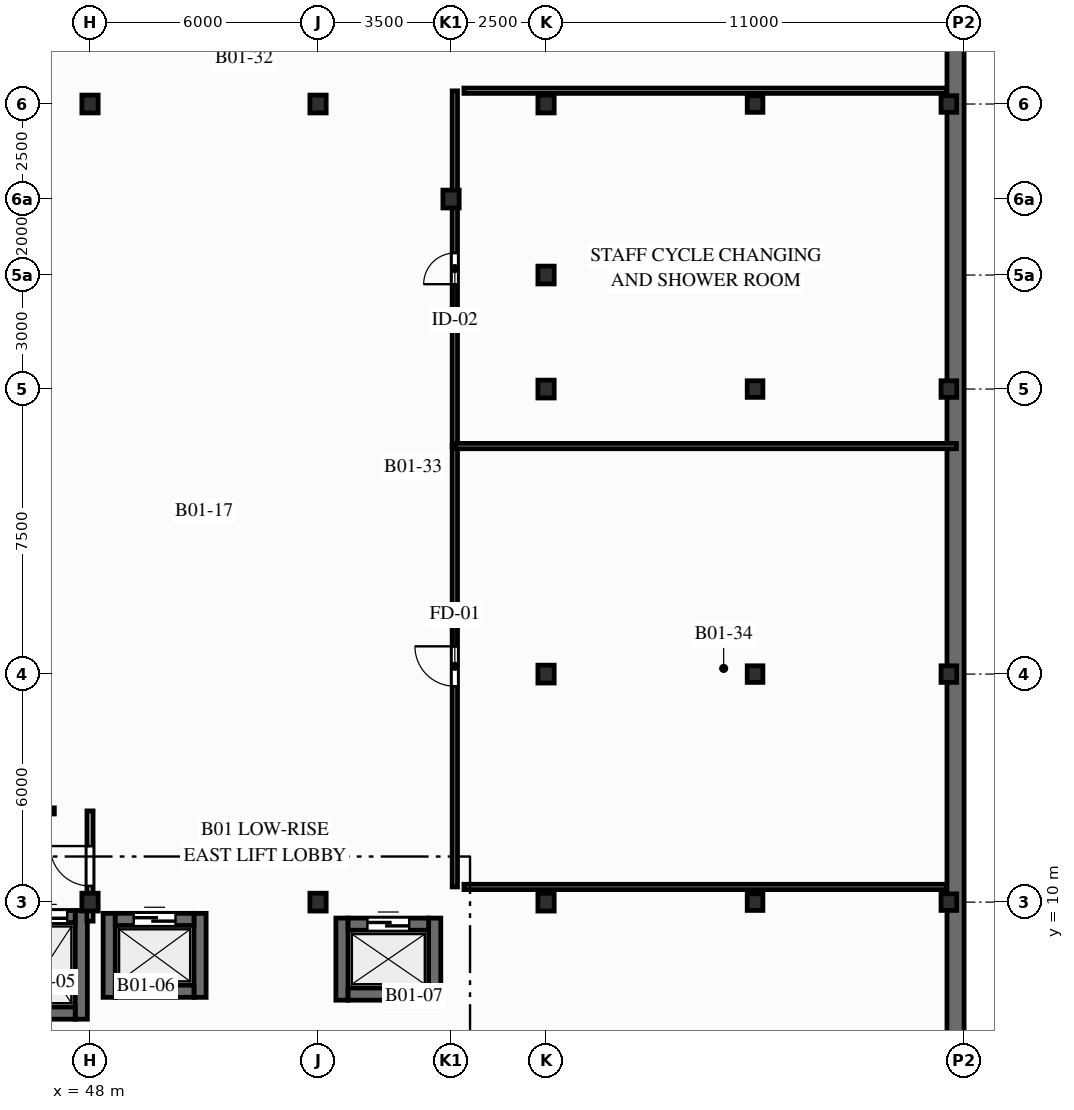
"""IFC4 building model, lengths in metres.
Left out: names, types, materials, properties, quantities, classifications, styles, units other than length and angle.
Written with IfcOpenShell. Run it as: python <this file> out.ifc"""

import sys

from ifc_helpers import new_model, si_unit, direction, frame, frame_2d, origin, origin_2d, place, context, subcontext, project, spatial, rectangle, i_section, extrude, element, fill, save


model = new_model("IFC4")
c1 = context("Model", 3, precision=1e-05, world=origin(), true_north=direction((0.0, 1.0)))
c2 = subcontext(c1, "Body", "Model", "MODEL_VIEW")
j1 = project(units=[si_unit("LENGTHUNIT", "METRE"), si_unit("PLANEANGLEUNIT", "RADIAN")], contexts=[c1])
p1 = place(None, origin())
s1 = spatial("IfcSite", under=j1, at=p1, CompositionType="ELEMENT")
p2 = place(p1, origin())
s2 = spatial("IfcBuilding", under=s1, at=p2, CompositionType="ELEMENT")
p3 = place(p2, frame((0.0, 0.0, -4.2)))
s3 = spatial("IfcBuildingStorey", under=s2, at=p3, CompositionType="ELEMENT", Elevation=-4.2)
for number, where, z_axis, x_axis in (
    (1, (48.0, 10.0, 0.0), (0.0, 0.0, 1.0), (1.0, 0.0, 0.0)),
    (2, (48.0, 31.0, 0.0), (0.0, 0.0, 1.0), (1.0, 0.0, 0.0)),
    (3, (54.0, 10.0, 0.0), (0.0, 0.0, 1.0), (1.0, 0.0, 0.0)),
    (4, (54.0, 31.0, 0.0), (0.0, 0.0, 1.0), (1.0, 0.0, 0.0)),
    (5, (57.5, 28.5, 0.0), (0.0, 0.0, 1.0), (1.0, 0.0, 0.0)),
    (6, (60.0, 10.0, 0.0), (0.0, 0.0, 1.0), (1.0, 0.0, 0.0)),
    (7, (60.0, 16.0, 0.0), (0.0, 0.0, 1.0), (1.0, 0.0, 0.0)),
    (8, (60.0, 23.5, 0.0), (0.0, 0.0, 1.0), (1.0, 0.0, 0.0)),
    (9, (60.0, 26.5, 0.0), (0.0, 0.0, 1.0), (1.0, 0.0, 0.0)),
    (10, (60.0, 31.0, 0.0), (0.0, 0.0, 1.0), (1.0, 0.0, 0.0)),
):
    element("IfcColumn", number, at=place(p3, frame(where, z_axis=z_axis, x_axis=x_axis)), inside=s3, PredefinedType="COLUMN", context=c2, shape_type="SweptSolid", body=[
        extrude(i_section(OverallWidth=0.428, OverallDepth=0.469, WebThickness=0.078, FlangeThickness=0.125, FilletRadius=0.015, at=origin_2d()), origin(), (0.0, 0.0, 1.0), 4.2),
    ])
for number, where, z_axis, x_axis in (
    (11, (65.5, 10.0, 0.0), (0.0, 0.0, 1.0), (1.0, 0.0, 0.0)),
    (12, (65.5, 16.0, 0.0), (0.0, 0.0, 1.0), (1.0, 0.0, 0.0)),
    (13, (65.5, 23.5, 0.0), (0.0, 0.0, 1.0), (1.0, 0.0, 0.0)),
    (14, (65.5, 31.0, 0.0), (0.0, 0.0, 1.0), (1.0, 0.0, 0.0)),
    (15, (70.6, 10.0, 0.0), (0.0, 0.0, 1.0), (1.0, 0.0, 0.0)),
    (16, (70.6, 16.0, 0.0), (0.0, 0.0, 1.0), (1.0, 0.0, 0.0)),
    (17, (70.6, 23.5, 0.0), (0.0, 0.0, 1.0), (1.0, 0.0, 0.0)),
    (18, (70.6, 31.0, 0.0), (0.0, 0.0, 1.0), (1.0, 0.0, 0.0)),
):
    element("IfcColumn", number, at=place(p3, frame(where, z_axis=z_axis, x_axis=x_axis)), inside=s3, PredefinedType="COLUMN", context=c2, shape_type="SweptSolid", body=[
        extrude(i_section(OverallWidth=0.412, OverallDepth=0.437, WebThickness=0.036, FlangeThickness=0.058, FilletRadius=0.015, at=origin_2d()), origin(), (0.0, 0.0, 1.0), 4.2),
    ])
p4 = place(p3, frame((70.775, -1.775, 0.0), z_axis=(0.0, 0.0, 1.0), x_axis=(0.0, 1.0, 0.0)))
e19 = element("IfcWall", 19, at=p4, inside=s3, PredefinedType="SHEAR", context=c2, shape_type="SweptSolid", body=[
    extrude(rectangle(XDim=41.55, YDim=0.45, at=frame_2d((20.775, 0.0))), origin(), (0.0, 0.0, 1.0), 3.22),
])
p5 = place(p3, frame((47.77, 6.92, 0.0), z_axis=(0.0, 0.0, 1.0), x_axis=(0.0, 1.0, 0.0)))
e20 = element("IfcWall", 20, at=p5, inside=s3, PredefinedType="SHEAR", context=c2, shape_type="SweptSolid", body=[
    extrude(rectangle(XDim=2.86, YDim=0.32, at=frame_2d((1.43, 0.0))), origin(), (0.0, 0.0, 1.0), 3.86),
])
p6 = place(p3, frame((46.09, 7.08, 0.0), z_axis=(0.0, 0.0, 1.0), x_axis=(1.0, 0.0, 0.0)))
e21 = element("IfcWall", 21, at=p6, inside=s3, PredefinedType="SHEAR", context=c2, shape_type="SweptSolid", body=[
    extrude(rectangle(XDim=1.52, YDim=0.32, at=frame_2d((0.76, 0.0))), origin(), (0.0, 0.0, 1.0), 3.86),
])
p7 = place(p3, frame((46.09, 9.62, 0.0), z_axis=(0.0, 0.0, 1.0), x_axis=(1.0, 0.0, 0.0)))
e22 = element("IfcWall", 22, at=p7, inside=s3, PredefinedType="SHEAR", context=c2, shape_type="SweptSolid", body=[
    extrude(rectangle(XDim=1.52, YDim=0.32, at=frame_2d((0.76, 0.0))), origin(), (0.0, 0.0, 1.0), 3.86),
])
p8 = place(p7, frame((0.21, 0.0, 0.0)))
e23 = element("IfcOpeningElement", 23, at=p8, cuts=e22, PredefinedType="OPENING", context=c2, shape_type="SweptSolid", body=[
    extrude(rectangle(XDim=1.1, YDim=2.06, at=frame_2d((0.55, 1.03))), frame((0.0, 0.17, 0.0), z_axis=(0.0, -1.0, 0.0), x_axis=(1.0, 0.0, 0.0)), (0.0, 0.0, 1.0), 0.34),
])
for number, where, z_axis, x_axis in (
    (24, (48.505, 7.495, 0.0), (0.0, 0.0, 1.0), (0.0, 1.0, 0.0)),
    (25, (50.895, 7.495, 0.0), (0.0, 0.0, 1.0), (0.0, 1.0, 0.0)),
):
    element("IfcWall", number, at=place(p3, frame(where, z_axis=z_axis, x_axis=x_axis)), inside=s3, PredefinedType="SHEAR", context=c2, shape_type="SweptSolid", body=[
        extrude(rectangle(XDim=2.21, YDim=0.32, at=frame_2d((1.105, 0.0))), origin(), (0.0, 0.0, 1.0), 3.86),
    ])
p9 = place(p3, frame((48.665, 7.655, 0.0), z_axis=(0.0, 0.0, 1.0), x_axis=(1.0, 0.0, 0.0)))
e26 = element("IfcWall", 26, at=p9, inside=s3, PredefinedType="SHEAR", context=c2, shape_type="SweptSolid", body=[
    extrude(rectangle(XDim=2.07, YDim=0.32, at=frame_2d((1.035, 0.0))), origin(), (0.0, 0.0, 1.0), 3.86),
])
p10 = place(p3, frame((48.665, 9.545, 0.0), z_axis=(0.0, 0.0, 1.0), x_axis=(1.0, 0.0, 0.0)))
e27 = element("IfcWall", 27, at=p10, inside=s3, PredefinedType="SHEAR", context=c2, shape_type="SweptSolid", body=[
    extrude(rectangle(XDim=2.07, YDim=0.32, at=frame_2d((1.035, 0.0))), origin(), (0.0, 0.0, 1.0), 3.86),
])
p11 = place(p10, frame((0.485, 0.0, 0.0)))
e28 = element("IfcOpeningElement", 28, at=p11, cuts=e27, PredefinedType="OPENING", context=c2, shape_type="SweptSolid", body=[
    extrude(rectangle(XDim=1.1, YDim=2.06, at=frame_2d((0.55, 1.03))), frame((0.0, 0.17, 0.0), z_axis=(0.0, -1.0, 0.0), x_axis=(1.0, 0.0, 0.0)), (0.0, 0.0, 1.0), 0.34),
])
for number, where, z_axis, x_axis in (
    (29, (54.63, 7.42, 0.0), (0.0, 0.0, 1.0), (0.0, 1.0, 0.0)),
    (30, (57.07, 7.42, 0.0), (0.0, 0.0, 1.0), (0.0, 1.0, 0.0)),
):
    element("IfcWall", number, at=place(p3, frame(where, z_axis=z_axis, x_axis=x_axis)), inside=s3, PredefinedType="SHEAR", context=c2, shape_type="SweptSolid", body=[
        extrude(rectangle(XDim=2.16, YDim=0.32, at=frame_2d((1.08, 0.0))), origin(), (0.0, 0.0, 1.0), 3.86),
    ])
p12 = place(p3, frame((54.79, 7.58, 0.0), z_axis=(0.0, 0.0, 1.0), x_axis=(1.0, 0.0, 0.0)))
e31 = element("IfcWall", 31, at=p12, inside=s3, PredefinedType="SHEAR", context=c2, shape_type="SweptSolid", body=[
    extrude(rectangle(XDim=2.12, YDim=0.32, at=frame_2d((1.06, 0.0))), origin(), (0.0, 0.0, 1.0), 3.86),
])
p13 = place(p3, frame((54.79, 9.42, 0.0), z_axis=(0.0, 0.0, 1.0), x_axis=(1.0, 0.0, 0.0)))
e32 = element("IfcWall", 32, at=p13, inside=s3, PredefinedType="SHEAR", context=c2, shape_type="SweptSolid", body=[
    extrude(rectangle(XDim=2.12, YDim=0.32, at=frame_2d((1.06, 0.0))), origin(), (0.0, 0.0, 1.0), 3.86),
])
p14 = place(p13, frame((0.51, 0.0, 0.0)))
e33 = element("IfcOpeningElement", 33, at=p14, cuts=e32, PredefinedType="OPENING", context=c2, shape_type="SweptSolid", body=[
    extrude(rectangle(XDim=1.1, YDim=2.06, at=frame_2d((0.55, 1.03))), frame((0.0, 0.17, 0.0), z_axis=(0.0, -1.0, 0.0), x_axis=(1.0, 0.0, 0.0)), (0.0, 0.0, 1.0), 0.34),
])
p15 = place(p3, frame((48.0, 9.5, 0.0), z_axis=(0.0, 0.0, 1.0), x_axis=(0.0, 1.0, 0.0)))
e34 = element("IfcWall", 34, at=p15, inside=s3, PredefinedType="PARTITIONING", context=c2, shape_type="SweptSolid", body=[
    extrude(rectangle(XDim=2.9, YDim=0.16, at=frame_2d((1.45, 0.0))), origin(), (0.0, 0.0, 1.0), 2.908),
])
p16 = place(p15, frame((0.925, 0.0, 0.0)))
e35 = element("IfcOpeningElement", 35, at=p16, cuts=e34, PredefinedType="OPENING", context=c2, shape_type="SweptSolid", body=[
    extrude(rectangle(XDim=1.05, YDim=2.06, at=frame_2d((0.525, 1.03))), frame((0.0, 0.09, 0.0), z_axis=(0.0, -1.0, 0.0), x_axis=(1.0, 0.0, 0.0)), (0.0, 0.0, 1.0), 0.18),
])
p17 = place(p3, frame((42.539, 12.4, 0.0), z_axis=(0.0, 0.0, 1.0), x_axis=(1.0, 0.0, 0.0)))
e36 = element("IfcWall", 36, at=p17, inside=s3, PredefinedType="PARTITIONING", context=c2, shape_type="SweptSolid", body=[
    extrude(rectangle(XDim=4.522, YDim=0.16, at=frame_2d((2.261, 0.0))), origin(), (0.0, 0.0, 1.0), 3.86),
])
p18 = place(p3, frame((57.6, 10.4, 0.0), z_axis=(0.0, 0.0, 1.0), x_axis=(0.0, 1.0, 0.0)))
e37 = element("IfcWall", 37, at=p18, inside=s3, PredefinedType="PARTITIONING", context=c2, shape_type="SweptSolid", body=[
    extrude(rectangle(XDim=11.611, YDim=0.14, at=frame_2d((5.806, 0.0))), origin(), (0.0, 0.0, 1.0), 3.378),
])
p19 = place(p18, frame((5.281, 0.0, 0.0)))
e38 = element("IfcOpeningElement", 38, at=p19, cuts=e37, PredefinedType="OPENING", context=c2, shape_type="SweptSolid", body=[
    extrude(rectangle(XDim=1.05, YDim=2.06, at=frame_2d((0.525, 1.03))), frame((0.0, 0.08, 0.0), z_axis=(0.0, -1.0, 0.0), x_axis=(1.0, 0.0, 0.0)), (0.0, 0.0, 1.0), 0.16),
])
p20 = place(p3, frame((57.6, 21.993, 0.0), z_axis=(0.0, 0.0, 1.0), x_axis=(0.0, 1.0, 0.0)))
e39 = element("IfcWall", 39, at=p20, inside=s3, PredefinedType="PARTITIONING", context=c2, shape_type="SweptSolid", body=[
    extrude(rectangle(XDim=9.353, YDim=0.14, at=frame_2d((4.677, 0.0))), origin(), (0.0, 0.0, 1.0), 3.223),
])
p21 = place(p20, frame((4.267, 0.0, 0.0)))
e40 = element("IfcOpeningElement", 40, at=p21, cuts=e39, PredefinedType="OPENING", context=c2, shape_type="SweptSolid", body=[
    extrude(rectangle(XDim=0.82, YDim=2.02, at=frame_2d((0.41, 1.01))), frame((0.0, 0.08, 0.0), z_axis=(0.0, -1.0, 0.0), x_axis=(1.0, 0.0, 0.0)), (0.0, 0.0, 1.0), 0.16),
])
p22 = place(p3, frame((57.604, 22.0, 0.0), z_axis=(0.0, 0.0, 1.0), x_axis=(1.0, 0.0, 0.0)))
e41 = element("IfcWall", 41, at=p22, inside=s3, PredefinedType="PARTITIONING", context=c2, shape_type="SweptSolid", body=[
    extrude(rectangle(XDim=13.196, YDim=0.14, at=frame_2d((6.598, 0.0))), origin(), (0.0, 0.0, 1.0), 2.908),
])
p23 = place(p3, frame((57.84, 10.4, 0.0), z_axis=(0.0, 0.0, 1.0), x_axis=(1.0, 0.0, 0.0)))
e42 = element("IfcWall", 42, at=p23, inside=s3, PredefinedType="PARTITIONING", context=c2, shape_type="SweptSolid", body=[
    extrude(rectangle(XDim=12.695, YDim=0.14, at=frame_2d((6.347, 0.0))), origin(), (0.0, 0.0, 1.0), 2.908),
])
p24 = place(p3, frame((57.84, 31.35, 0.0), z_axis=(0.0, 0.0, 1.0), x_axis=(1.0, 0.0, 0.0)))
e43 = element("IfcWall", 43, at=p24, inside=s3, PredefinedType="PARTITIONING", context=c2, shape_type="SweptSolid", body=[
    extrude(rectangle(XDim=12.695, YDim=0.14, at=frame_2d((6.348, 0.0))), origin(), (0.0, 0.0, 1.0), 2.908),
])
p25 = place(p8, origin())
e44 = element("IfcDoor", 44, at=p25, inside=s3, OperationType="SLIDING_TO_RIGHT", PredefinedType="DOOR", context=c2, shape_type="SweptSolid", body=[
    extrude(rectangle(XDim=1.1, YDim=2.06, at=frame_2d((0.55, 1.03))), frame((0.0, 0.025, 0.0), z_axis=(0.0, -1.0, 0.0), x_axis=(1.0, 0.0, 0.0)), (0.0, 0.0, 1.0), 0.05),
])
fill(e23, e44)
p26 = place(p11, origin())
e45 = element("IfcDoor", 45, at=p26, inside=s3, OperationType="SLIDING_TO_LEFT", PredefinedType="DOOR", context=c2, shape_type="SweptSolid", body=[
    extrude(rectangle(XDim=1.1, YDim=2.06, at=frame_2d((0.55, 1.03))), frame((0.0, 0.025, 0.0), z_axis=(0.0, -1.0, 0.0), x_axis=(1.0, 0.0, 0.0)), (0.0, 0.0, 1.0), 0.05),
])
fill(e28, e45)
p27 = place(p14, origin())
e46 = element("IfcDoor", 46, at=p27, inside=s3, OperationType="SLIDING_TO_RIGHT", PredefinedType="DOOR", context=c2, shape_type="SweptSolid", body=[
    extrude(rectangle(XDim=1.1, YDim=2.06, at=frame_2d((0.55, 1.03))), frame((0.0, 0.025, 0.0), z_axis=(0.0, -1.0, 0.0), x_axis=(1.0, 0.0, 0.0)), (0.0, 0.0, 1.0), 0.05),
])
fill(e33, e46)
p28 = place(p16, origin())
e47 = element("IfcDoor", 47, at=p28, inside=s3, OperationType="SINGLE_SWING_RIGHT", PredefinedType="DOOR", context=c2, shape_type="SweptSolid", body=[
    extrude(rectangle(XDim=1.05, YDim=2.06, at=frame_2d((0.525, 1.03))), frame((0.0, 0.025, 0.0), z_axis=(0.0, -1.0, 0.0), x_axis=(1.0, 0.0, 0.0)), (0.0, 0.0, 1.0), 0.05),
])
fill(e35, e47)
p29 = place(p19, origin())
e48 = element("IfcDoor", 48, at=p29, inside=s3, OperationType="SINGLE_SWING_RIGHT", PredefinedType="DOOR", context=c2, shape_type="SweptSolid", body=[
    extrude(rectangle(XDim=1.05, YDim=2.06, at=frame_2d((0.525, 1.03))), frame((0.0, 0.025, 0.0), z_axis=(0.0, -1.0, 0.0), x_axis=(1.0, 0.0, 0.0)), (0.0, 0.0, 1.0), 0.05),
])
fill(e38, e48)
p30 = place(p21, origin())
e49 = element("IfcDoor", 49, at=p30, inside=s3, OperationType="SINGLE_SWING_LEFT", PredefinedType="DOOR", context=c2, shape_type="SweptSolid", body=[
    extrude(rectangle(XDim=0.82, YDim=2.02, at=frame_2d((0.41, 1.01))), frame((0.0, 0.025, 0.0), z_axis=(0.0, -1.0, 0.0), x_axis=(1.0, 0.0, 0.0)), (0.0, 0.0, 1.0), 0.05),
])
fill(e40, e49)
save(model, sys.argv[1])
